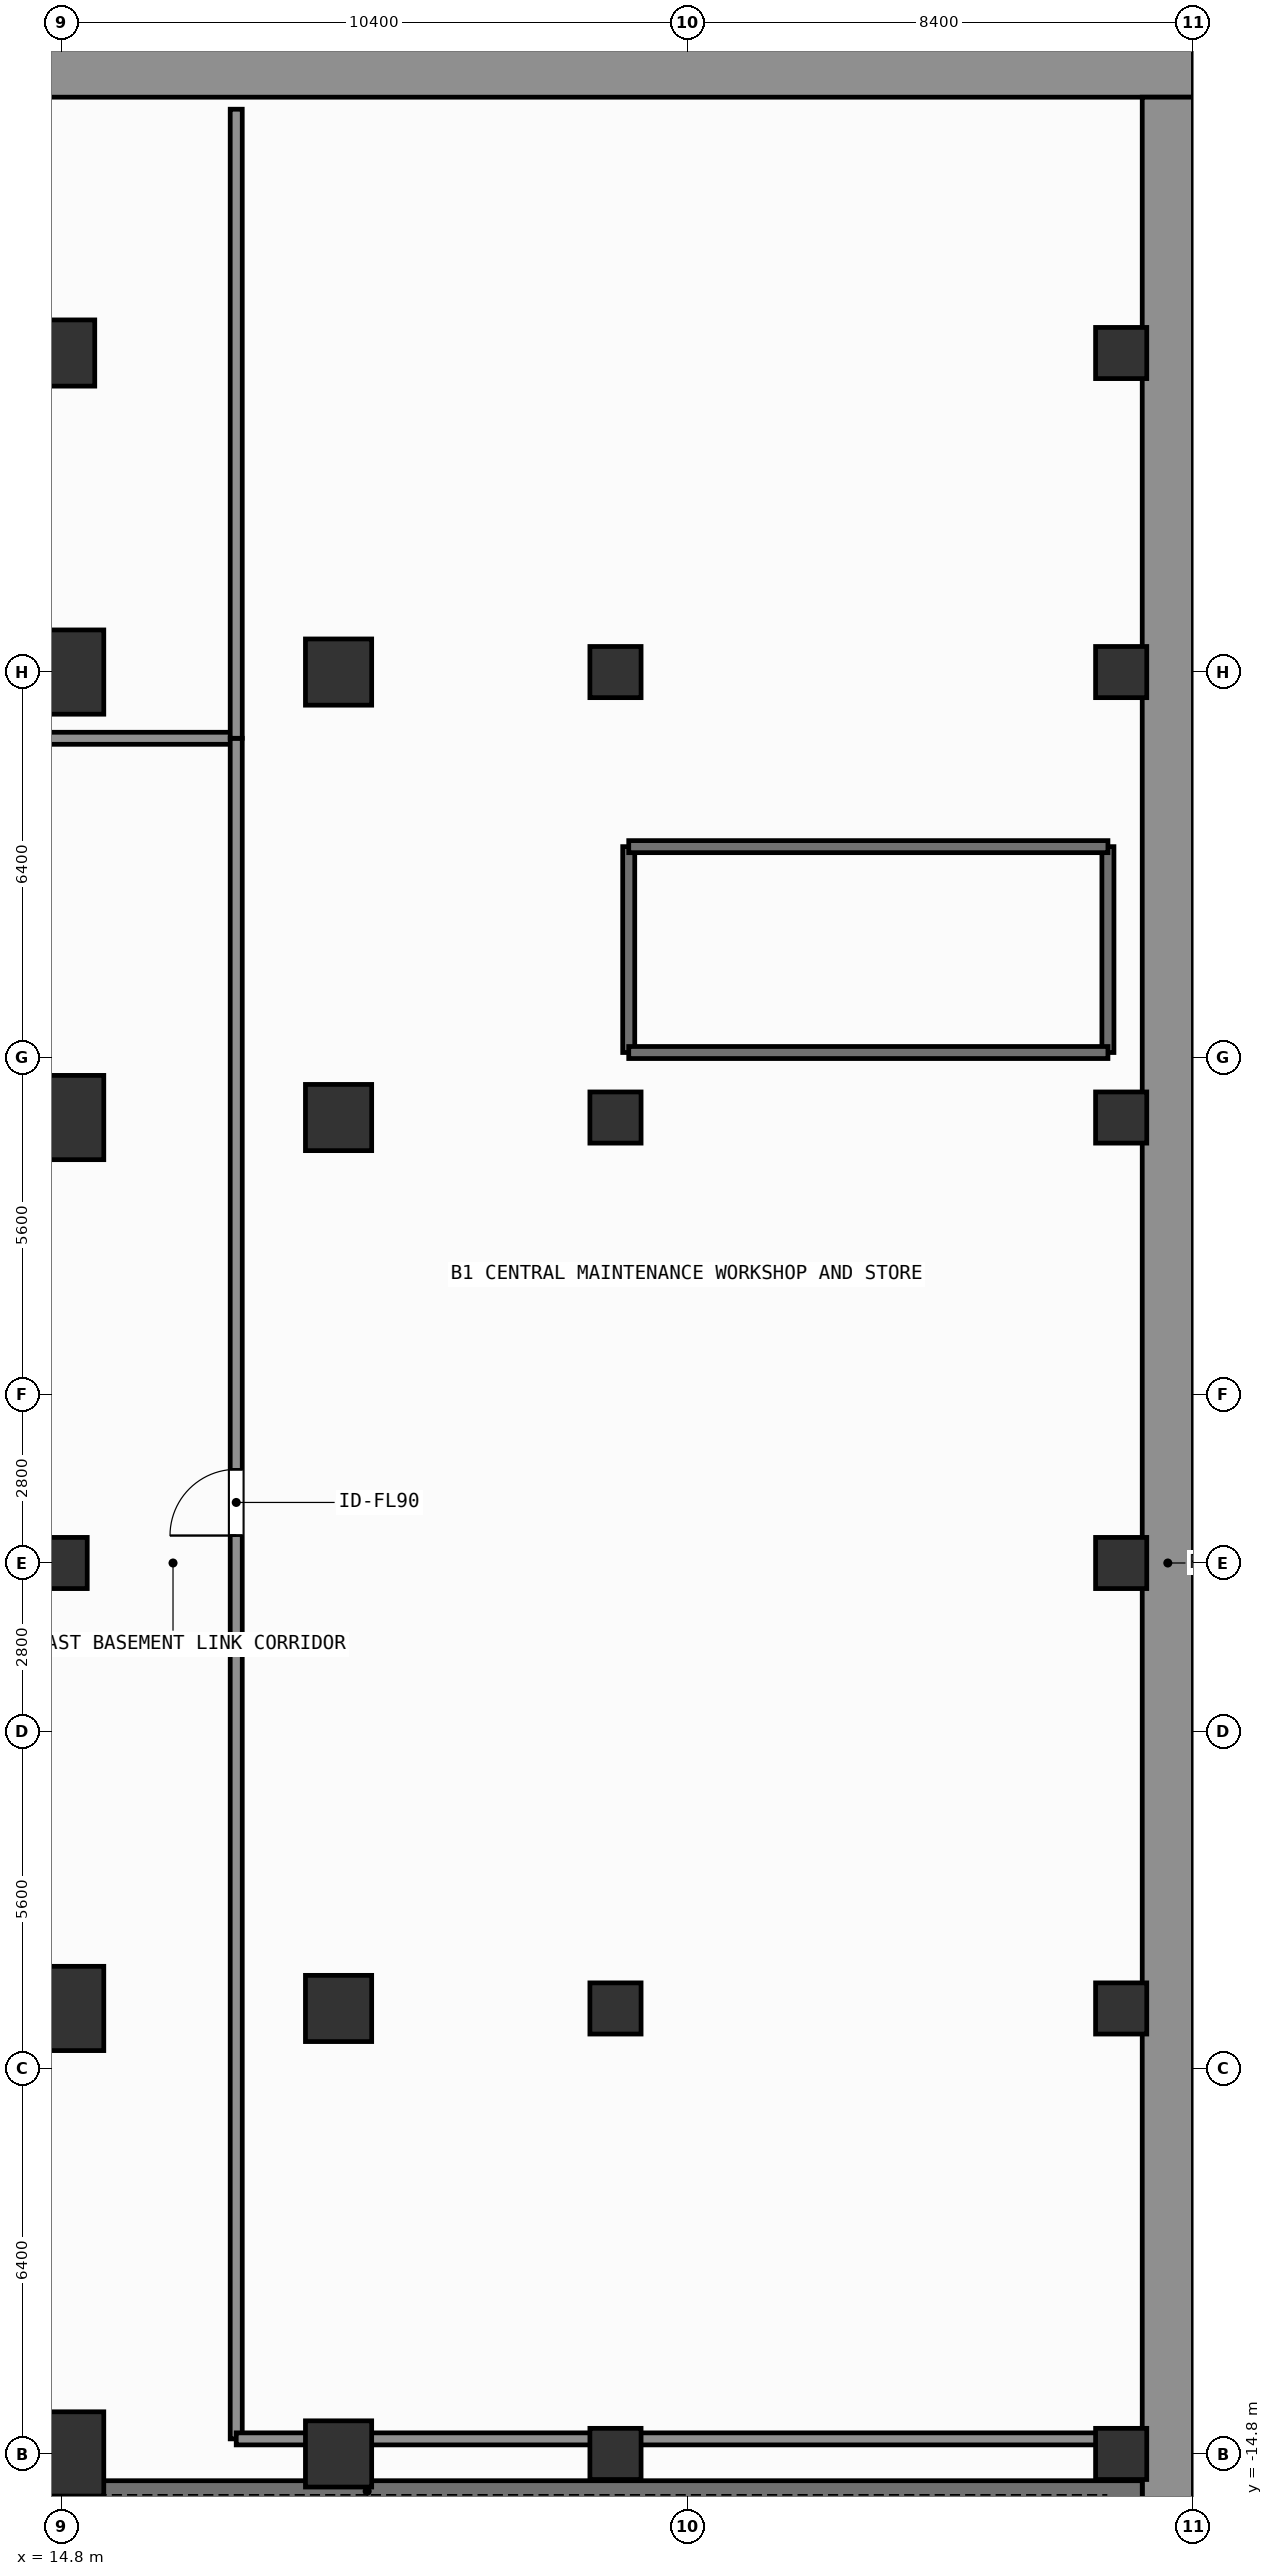
"""IFC4 building model, lengths in metres.
Left out: names, types, materials, properties, quantities, classifications, styles, units other than length and angle.
Written with IfcOpenShell. Run it as: python <this file> out.ifc"""

import sys

from ifc_helpers import new_model, si_unit, direction, frame, frame_2d, origin, origin_2d, place, context, subcontext, project, spatial, rectangle, extrude, element, fill, save


model = new_model("IFC4")
c1 = context("Model", 3, precision=1e-05, world=origin(), true_north=direction((0.0, 1.0)))
c2 = subcontext(c1, "Body", "Model", "MODEL_VIEW")
j1 = project(units=[si_unit("LENGTHUNIT", "METRE"), si_unit("PLANEANGLEUNIT", "RADIAN")], contexts=[c1])
p1 = place(None, origin())
s1 = spatial("IfcSite", under=j1, at=p1, CompositionType="ELEMENT")
p2 = place(p1, origin())
s2 = spatial("IfcBuilding", under=s1, at=p2, CompositionType="ELEMENT")
p3 = place(p2, frame((0.0, 0.0, -4.2)))
s3 = spatial("IfcBuildingStorey", under=s2, at=p3, CompositionType="ELEMENT", Elevation=-4.2)
p4 = place(p3, frame((-33.6, 24.775, 0.0), z_axis=(0.0, 0.0, 1.0), x_axis=(1.0, 0.0, 0.0)))
e1 = element("IfcWall", 1, at=p4, inside=s3, PredefinedType="SOLIDWALL", context=c2, shape_type="SweptSolid", body=[
    extrude(rectangle(XDim=67.2, YDim=0.85, at=frame_2d((33.6, 0.0))), origin(), (0.0, 0.0, 1.0), 4.2),
])
p5 = place(p3, frame((33.175, -24.35, 0.0), z_axis=(0.0, 0.0, 1.0), x_axis=(0.0, 1.0, 0.0)))
e2 = element("IfcWall", 2, at=p5, inside=s3, PredefinedType="SOLIDWALL", context=c2, shape_type="SweptSolid", body=[
    extrude(rectangle(XDim=48.7, YDim=0.85, at=frame_2d((24.35, 0.0))), origin(), (0.0, 0.0, 1.0), 4.2),
])
p6 = place(p3, frame((7.0, -15.42, 0.0), z_axis=(0.0, 0.0, 1.0), x_axis=(1.0, 0.0, 0.0)))
e3 = element("IfcWall", 3, at=p6, inside=s3, PredefinedType="SHEAR", context=c2, shape_type="SweptSolid", body=[
    extrude(rectangle(XDim=25.75, YDim=0.35, at=frame_2d((12.875, 0.0))), origin(), (0.0, 0.0, 1.0), 4.2),
])
for number, where, z_axis, x_axis in (
    (4, (14.8, -14.8, 0.0), (0.0, 0.0, 1.0), (1.0, 0.0, 0.0)),
    (5, (14.8, 14.8, 0.0), (0.0, 0.0, 1.0), (1.0, 0.0, 0.0)),
    (6, (14.8, -7.4, 0.0), (0.0, 0.0, 1.0), (1.0, 0.0, 0.0)),
    (7, (14.8, 7.4, 0.0), (0.0, 0.0, 1.0), (1.0, 0.0, 0.0)),
):
    element("IfcColumn", number, at=place(p3, frame(where, z_axis=z_axis, x_axis=x_axis)), inside=s3, PredefinedType="COLUMN", context=c2, shape_type="SweptSolid", body=[
        extrude(rectangle(XDim=1.4, YDim=1.4, at=origin_2d()), origin(), (0.0, 0.0, 1.0), 4.2),
    ])
for number, where, z_axis, x_axis in (
    (8, (19.4, -14.8, 0.0), (0.0, 0.0, 1.0), (1.0, 0.0, 0.0)),
    (9, (19.4, -7.4, 0.0), (0.0, 0.0, 1.0), (1.0, 0.0, 0.0)),
    (10, (19.4, 7.4, 0.0), (0.0, 0.0, 1.0), (1.0, 0.0, 0.0)),
    (11, (19.4, 14.8, 0.0), (0.0, 0.0, 1.0), (1.0, 0.0, 0.0)),
    (12, (14.8, 20.1, 0.0), (0.0, 0.0, 1.0), (1.0, 0.0, 0.0)),
):
    element("IfcColumn", number, at=place(p3, frame(where, z_axis=z_axis, x_axis=x_axis)), inside=s3, PredefinedType="COLUMN", context=c2, shape_type="SweptSolid", body=[
        extrude(rectangle(XDim=1.1, YDim=1.1, at=origin_2d()), origin(), (0.0, 0.0, 1.0), 4.2),
    ])
for number, where, z_axis, x_axis in (
    (13, (14.8, 0.0, 0.0), (0.0, 0.0, 1.0), (1.0, 0.0, 0.0)),
    (14, (24.0, -14.8, 0.0), (0.0, 0.0, 1.0), (1.0, 0.0, 0.0)),
    (15, (24.0, -7.4, 0.0), (0.0, 0.0, 1.0), (1.0, 0.0, 0.0)),
    (16, (24.0, 7.4, 0.0), (0.0, 0.0, 1.0), (1.0, 0.0, 0.0)),
    (17, (24.0, 14.8, 0.0), (0.0, 0.0, 1.0), (1.0, 0.0, 0.0)),
    (18, (32.4, -14.8, 0.0), (0.0, 0.0, 1.0), (1.0, 0.0, 0.0)),
    (19, (32.4, -7.4, 0.0), (0.0, 0.0, 1.0), (1.0, 0.0, 0.0)),
    (20, (32.4, 0.0, 0.0), (0.0, 0.0, 1.0), (1.0, 0.0, 0.0)),
    (21, (32.4, 7.4, 0.0), (0.0, 0.0, 1.0), (1.0, 0.0, 0.0)),
    (22, (32.4, 14.8, 0.0), (0.0, 0.0, 1.0), (1.0, 0.0, 0.0)),
    (23, (32.4, 20.1, 0.0), (0.0, 0.0, 1.0), (1.0, 0.0, 0.0)),
):
    element("IfcColumn", number, at=place(p3, frame(where, z_axis=z_axis, x_axis=x_axis)), inside=s3, PredefinedType="COLUMN", context=c2, shape_type="SweptSolid", body=[
        extrude(rectangle(XDim=0.85, YDim=0.85, at=origin_2d()), origin(), (0.0, 0.0, 1.0), 4.2),
    ])
for number, where, z_axis, x_axis in (
    (24, (24.22, 8.48, 0.0), (0.0, 0.0, 1.0), (0.0, 1.0, 0.0)),
    (25, (32.18, 11.9, 0.0), (0.0, 0.0, 1.0), (0.0, -1.0, 0.0)),
):
    element("IfcWall", number, at=place(p3, frame(where, z_axis=z_axis, x_axis=x_axis)), inside=s3, PredefinedType="SHEAR", context=c2, shape_type="SweptSolid", body=[
        extrude(rectangle(XDim=3.42, YDim=0.2, at=frame_2d((1.71, 0.0))), origin(), (0.0, 0.0, 1.0), 3.9),
    ])
for number, where, z_axis, x_axis in (
    (26, (32.18, 8.48, 0.0), (0.0, 0.0, 1.0), (-1.0, 0.0, 0.0)),
    (27, (24.22, 11.9, 0.0), (0.0, 0.0, 1.0), (1.0, 0.0, 0.0)),
):
    element("IfcWall", number, at=place(p3, frame(where, z_axis=z_axis, x_axis=x_axis)), inside=s3, PredefinedType="SHEAR", context=c2, shape_type="SweptSolid", body=[
        extrude(rectangle(XDim=7.96, YDim=0.2, at=frame_2d((3.98, 0.0))), origin(), (0.0, 0.0, 1.0), 3.9),
    ])
p7 = place(p3, frame((-13.6, 13.7, 0.0), z_axis=(0.0, 0.0, 1.0), x_axis=(1.0, 0.0, 0.0)))
e28 = element("IfcWall", 28, at=p7, inside=s3, PredefinedType="SOLIDWALL", context=c2, shape_type="SweptSolid", body=[
    extrude(rectangle(XDim=31.3, YDim=0.2, at=frame_2d((15.65, 0.0))), origin(), (0.0, 0.0, 1.0), 3.9),
])
p8 = place(p7, frame((14.38, 0.0, 0.0)))
e29 = element("IfcOpeningElement", 29, at=p8, cuts=e28, PredefinedType="OPENING", context=c2, shape_type="SweptSolid", body=[
    extrude(rectangle(XDim=1.1, YDim=2.15, at=frame_2d((0.55, 1.075))), frame((0.0, 0.11, 0.0), z_axis=(0.0, -1.0, 0.0), x_axis=(1.0, 0.0, 0.0)), (0.0, 0.0, 1.0), 0.22),
])
p9 = place(p3, frame((17.7, -14.55, 0.0), z_axis=(0.0, 0.0, 1.0), x_axis=(0.0, 1.0, 0.0)))
e30 = element("IfcWall", 30, at=p9, inside=s3, PredefinedType="SOLIDWALL", context=c2, shape_type="SweptSolid", body=[
    extrude(rectangle(XDim=28.25, YDim=0.2, at=frame_2d((14.125, 0.0))), origin(), (0.0, 0.0, 1.0), 3.9),
])
p10 = place(p9, frame((15.006, 0.0, 0.0)))
e31 = element("IfcOpeningElement", 31, at=p10, cuts=e30, PredefinedType="OPENING", context=c2, shape_type="SweptSolid", body=[
    extrude(rectangle(XDim=1.1, YDim=2.15, at=frame_2d((0.55, 1.075))), frame((0.0, 0.11, 0.0), z_axis=(0.0, -1.0, 0.0), x_axis=(1.0, 0.0, 0.0)), (0.0, 0.0, 1.0), 0.22),
])
p11 = place(p3, frame((17.7, 13.7, 0.0), z_axis=(0.0, 0.0, 1.0), x_axis=(0.0, 1.0, 0.0)))
e32 = element("IfcWall", 32, at=p11, inside=s3, PredefinedType="SOLIDWALL", context=c2, shape_type="SweptSolid", body=[
    extrude(rectangle(XDim=10.45, YDim=0.2, at=frame_2d((5.225, 0.0))), origin(), (0.0, 0.0, 1.0), 3.9),
])
p12 = place(p3, frame((17.7, -14.55, 0.0), z_axis=(0.0, 0.0, 1.0), x_axis=(1.0, 0.0, 0.0)))
e33 = element("IfcWall", 33, at=p12, inside=s3, PredefinedType="SOLIDWALL", context=c2, shape_type="SweptSolid", body=[
    extrude(rectangle(XDim=14.95, YDim=0.2, at=frame_2d((7.475, 0.0))), origin(), (0.0, 0.0, 1.0), 2.99),
])
p13 = place(p10, origin())
e34 = element("IfcDoor", 34, at=p13, inside=s3, OperationType="SINGLE_SWING_LEFT", PredefinedType="DOOR", context=c2, shape_type="SweptSolid", body=[
    extrude(rectangle(XDim=1.1, YDim=2.15, at=frame_2d((0.55, 1.075))), frame((0.0, 0.025, 0.0), z_axis=(0.0, -1.0, 0.0), x_axis=(1.0, 0.0, 0.0)), (0.0, 0.0, 1.0), 0.05),
])
fill(e31, e34)
save(model, sys.argv[1])
